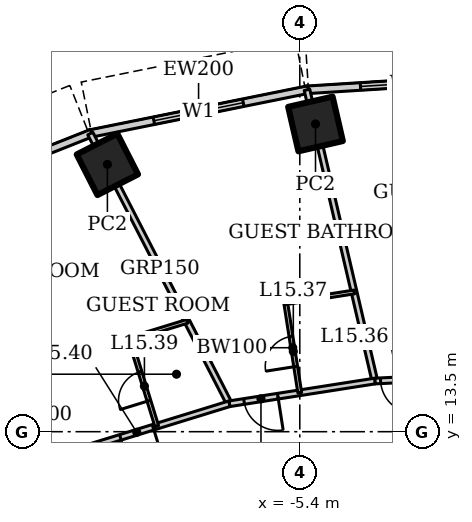
"""IFC4 building model, lengths in metres.
Left out: names, types, materials, properties, quantities, classifications, styles, units other than length and angle.
Written with IfcOpenShell. Run it as: python <this file> out.ifc"""

import sys

from ifc_helpers import new_model, si_unit, direction, frame, frame_2d, origin, origin_2d, place, context, subcontext, project, spatial, rectangle, hollow_rectangle, extrude, element, fill, save


model = new_model("IFC4")
c1 = context("Model", 3, precision=1e-05, world=origin(), true_north=direction((0.0, 1.0)))
c2 = subcontext(c1, "Body", "Model", "MODEL_VIEW")
j1 = project(units=[si_unit("LENGTHUNIT", "METRE"), si_unit("PLANEANGLEUNIT", "RADIAN")], contexts=[c1])
p1 = place(None, origin())
s1 = spatial("IfcSite", under=j1, at=p1, CompositionType="ELEMENT")
p2 = place(p1, origin())
s2 = spatial("IfcBuilding", under=s1, at=p2, CompositionType="ELEMENT")
p3 = place(p2, frame((0.0, 0.0, 69.4)))
s3 = spatial("IfcBuildingStorey", under=s2, at=p3, CompositionType="ELEMENT", Elevation=69.4)
for number, where, z_axis, x_axis in (
    (1, (-4.986, 21.598, 0.0), (0.0, 0.0, 1.0), (0.974, 0.225, 0.0)),
    (2, (-10.463, 20.534, 0.0), (0.0, 0.0, 1.0), (0.891, 0.454, 0.0)),
):
    element("IfcColumn", number, at=place(p3, frame(where, z_axis=z_axis, x_axis=x_axis)), inside=s3, PredefinedType="COLUMN", context=c2, shape_type="SweptSolid", body=[
        extrude(hollow_rectangle(XDim=1.2, YDim=1.2, WallThickness=0.1, at=origin_2d()), origin(), (0.0, 0.0, 1.0), 3.6),
    ])
p4 = place(p3, frame((0.041, 22.827, 0.0), z_axis=(0.0, 0.0, 1.0), x_axis=(-0.998018582375, -0.062919863585, 0.0)))
e3 = element("IfcWall", 3, at=p4, inside=s3, PredefinedType="SOLIDWALL", context=c2, shape_type="SweptSolid", body=[
    extrude(rectangle(XDim=5.304, YDim=0.2, at=frame_2d((2.652, 0.0))), origin(), (0.0, 0.0, 1.0), 3.45),
])
p5 = place(p4, frame((1.452, 0.0, 0.5)))
e4 = element("IfcOpeningElement", 4, at=p5, cuts=e3, PredefinedType="OPENING", context=c2, shape_type="SweptSolid", body=[
    extrude(rectangle(XDim=2.4, YDim=2.2, at=frame_2d((1.2, 1.1))), frame((0.0, 0.11, 0.0), z_axis=(0.0, -1.0, 0.0), x_axis=(1.0, 0.0, 0.0)), (0.0, 0.0, 1.0), 0.22),
])
p6 = place(p3, frame((-5.17, 22.504, 0.0), z_axis=(0.0, 0.0, 1.0), x_axis=(-0.980251657452, -0.197754110105, 0.0)))
e5 = element("IfcWall", 5, at=p6, inside=s3, PredefinedType="SOLIDWALL", context=c2, shape_type="SweptSolid", body=[
    extrude(rectangle(XDim=5.904, YDim=0.2, at=frame_2d((2.952, 0.0))), origin(), (0.0, 0.0, 1.0), 3.45),
])
p7 = place(p6, frame((1.752, 0.0, 0.5)))
e6 = element("IfcOpeningElement", 6, at=p7, cuts=e5, PredefinedType="OPENING", context=c2, shape_type="SweptSolid", body=[
    extrude(rectangle(XDim=2.4, YDim=2.2, at=frame_2d((1.2, 1.1))), frame((0.0, 0.11, 0.0), z_axis=(0.0, -1.0, 0.0), x_axis=(1.0, 0.0, 0.0)), (0.0, 0.0, 1.0), 0.22),
])
p8 = place(p3, frame((-10.869, 21.363, 0.0), z_axis=(0.0, 0.0, 1.0), x_axis=(-0.929358351251, -0.369178892895, 0.0)))
e7 = element("IfcWall", 7, at=p8, inside=s3, PredefinedType="SOLIDWALL", context=c2, shape_type="SweptSolid", body=[
    extrude(rectangle(XDim=7.692, YDim=0.2, at=frame_2d((3.846, 0.0))), origin(), (0.0, 0.0, 1.0), 3.45),
])
p9 = place(p8, frame((2.646, 0.0, 0.5)))
e8 = element("IfcOpeningElement", 8, at=p9, cuts=e7, PredefinedType="OPENING", context=c2, shape_type="SweptSolid", body=[
    extrude(rectangle(XDim=2.4, YDim=2.2, at=frame_2d((1.2, 1.1))), frame((0.0, 0.11, 0.0), z_axis=(0.0, -1.0, 0.0), x_axis=(1.0, 0.0, 0.0)), (0.0, 0.0, 1.0), 0.22),
])
p10 = place(p3, frame((-5.211, 22.496, 0.0), z_axis=(0.0, 0.0, 1.0), x_axis=(0.227056984461, -0.973881474209, 0.0)))
e9 = element("IfcWall", 9, at=p10, inside=s3, PredefinedType="PARTITIONING", context=c2, shape_type="SweptSolid", body=[
    extrude(rectangle(XDim=7.869, YDim=0.15, at=frame_2d((3.934, 0.0))), origin(), (0.0, 0.0, 1.0), 2.767),
])
p11 = place(p3, frame((-10.912, 21.346, 0.0), z_axis=(0.0, 0.0, 1.0), x_axis=(0.45752665959, -0.889195904042, 0.0)))
e10 = element("IfcWall", 10, at=p11, inside=s3, PredefinedType="PARTITIONING", context=c2, shape_type="SweptSolid", body=[
    extrude(rectangle(XDim=7.997, YDim=0.15, at=frame_2d((3.999, 0.0))), origin(), (0.0, 0.0, 1.0), 2.528),
])
p12 = place(p3, frame((0.0, 15.0, 0.0), z_axis=(0.0, 0.0, 1.0), x_axis=(-0.998809560203, -0.048779733975, 0.0)))
e11 = element("IfcWall", 11, at=p12, inside=s3, PredefinedType="PARTITIONING", context=c2, shape_type="SweptSolid", body=[
    extrude(rectangle(XDim=3.428, YDim=0.15, at=frame_2d((1.714, 0.0))), origin(), (0.0, 0.0, 1.0), 3.45),
])
p13 = place(p12, frame((2.378, 0.0, 0.0)))
e12 = element("IfcOpeningElement", 12, at=p13, cuts=e11, PredefinedType="OPENING", context=c2, shape_type="SweptSolid", body=[
    extrude(rectangle(XDim=0.9, YDim=2.1, at=frame_2d((0.45, 1.05))), frame((0.0, 0.085, 0.0), z_axis=(0.0, -1.0, 0.0), x_axis=(1.0, 0.0, 0.0)), (0.0, 0.0, 1.0), 0.17),
])
p14 = place(p3, frame((-3.424, 14.833, 0.0), z_axis=(0.0, 0.0, 1.0), x_axis=(-0.988015036573, -0.154357660987, 0.0)))
e13 = element("IfcWall", 13, at=p14, inside=s3, PredefinedType="PARTITIONING", context=c2, shape_type="SweptSolid", body=[
    extrude(rectangle(XDim=3.875, YDim=0.15, at=frame_2d((1.938, 0.0))), origin(), (0.0, 0.0, 1.0), 3.45),
])
p15 = place(p14, frame((2.583, 0.0, 0.0)))
e14 = element("IfcOpeningElement", 14, at=p15, cuts=e13, PredefinedType="OPENING", context=c2, shape_type="SweptSolid", body=[
    extrude(rectangle(XDim=0.9, YDim=2.1, at=frame_2d((0.45, 1.05))), frame((0.0, 0.085, 0.0), z_axis=(0.0, -1.0, 0.0), x_axis=(1.0, 0.0, 0.0)), (0.0, 0.0, 1.0), 0.17),
])
p16 = place(p3, frame((-7.253, 14.235, 0.0), z_axis=(0.0, 0.0, 1.0), x_axis=(-0.955657956744, -0.294478980085, 0.0)))
e15 = element("IfcWall", 15, at=p16, inside=s3, PredefinedType="PARTITIONING", context=c2, shape_type="SweptSolid", body=[
    extrude(rectangle(XDim=5.236, YDim=0.15, at=frame_2d((2.618, 0.0))), origin(), (0.0, 0.0, 1.0), 3.45),
])
p17 = place(p16, frame((2.1, 0.0, 0.0)))
e16 = element("IfcOpeningElement", 16, at=p17, cuts=e15, PredefinedType="OPENING", context=c2, shape_type="SweptSolid", body=[
    extrude(rectangle(XDim=0.9, YDim=2.1, at=frame_2d((0.45, 1.05))), frame((0.0, 0.085, 0.0), z_axis=(0.0, -1.0, 0.0), x_axis=(1.0, 0.0, 0.0)), (0.0, 0.0, 1.0), 0.17),
])
p18 = place(p3, frame((-5.4, 14.524, 0.0), z_axis=(0.0, 0.0, 1.0), x_axis=(-0.154426532979, 0.988004274238, 0.0)))
e17 = element("IfcWall", 17, at=p18, inside=s3, PredefinedType="PARTITIONING", context=c2, shape_type="SweptSolid", body=[
    extrude(rectangle(XDim=2.4, YDim=0.1, at=frame_2d((1.2, 0.0))), origin(), (0.0, 0.0, 1.0), 3.45),
])
p19 = place(p18, frame((0.7, 0.0, 0.0)))
e18 = element("IfcOpeningElement", 18, at=p19, cuts=e17, PredefinedType="OPENING", context=c2, shape_type="SweptSolid", body=[
    extrude(rectangle(XDim=0.8, YDim=2.1, at=frame_2d((0.4, 1.05))), frame((0.0, 0.06, 0.0), z_axis=(0.0, -1.0, 0.0), x_axis=(1.0, 0.0, 0.0)), (0.0, 0.0, 1.0), 0.12),
])
p20 = place(p3, frame((-5.771, 16.895, 0.0), z_axis=(0.0, 0.0, 1.0), x_axis=(0.98801840204, 0.154336117711, 0.0)))
e19 = element("IfcWall", 19, at=p20, inside=s3, PredefinedType="PARTITIONING", context=c2, shape_type="SweptSolid", body=[
    extrude(rectangle(XDim=1.827, YDim=0.1, at=frame_2d((0.914, 0.0))), origin(), (0.0, 0.0, 1.0), 3.45),
])
p21 = place(p3, frame((-9.164, 13.646, 0.0), z_axis=(0.0, 0.0, 1.0), x_axis=(-0.294507586191, 0.955649141514, 0.0)))
e20 = element("IfcWall", 20, at=p21, inside=s3, PredefinedType="PARTITIONING", context=c2, shape_type="SweptSolid", body=[
    extrude(rectangle(XDim=2.4, YDim=0.1, at=frame_2d((1.2, 0.0))), origin(), (0.0, 0.0, 1.0), 3.45),
])
p22 = place(p21, frame((0.7, 0.0, 0.0)))
e21 = element("IfcOpeningElement", 21, at=p22, cuts=e20, PredefinedType="OPENING", context=c2, shape_type="SweptSolid", body=[
    extrude(rectangle(XDim=0.8, YDim=2.1, at=frame_2d((0.4, 1.05))), frame((0.0, 0.06, 0.0), z_axis=(0.0, -1.0, 0.0), x_axis=(1.0, 0.0, 0.0)), (0.0, 0.0, 1.0), 0.12),
])
p23 = place(p3, frame((-9.871, 15.939, 0.0), z_axis=(0.0, 0.0, 1.0), x_axis=(0.955642133669, 0.29453032502, 0.0)))
e22 = element("IfcWall", 22, at=p23, inside=s3, PredefinedType="PARTITIONING", context=c2, shape_type="SweptSolid", body=[
    extrude(rectangle(XDim=1.583, YDim=0.1, at=frame_2d((0.791, 0.0))), origin(), (0.0, 0.0, 1.0), 3.45),
])
p24 = place(p5, origin())
e23 = element("IfcWindow", 23, at=p24, inside=s3, PartitioningType="SINGLE_PANEL", PredefinedType="WINDOW", context=c2, shape_type="SweptSolid", body=[
    extrude(rectangle(XDim=2.4, YDim=2.2, at=frame_2d((1.2, 1.1))), frame((0.0, 0.03, 0.0), z_axis=(0.0, -1.0, 0.0), x_axis=(1.0, 0.0, 0.0)), (0.0, 0.0, 1.0), 0.06),
])
fill(e4, e23)
p25 = place(p7, origin())
e24 = element("IfcWindow", 24, at=p25, inside=s3, PartitioningType="SINGLE_PANEL", PredefinedType="WINDOW", context=c2, shape_type="SweptSolid", body=[
    extrude(rectangle(XDim=2.4, YDim=2.2, at=frame_2d((1.2, 1.1))), frame((0.0, 0.03, 0.0), z_axis=(0.0, -1.0, 0.0), x_axis=(1.0, 0.0, 0.0)), (0.0, 0.0, 1.0), 0.06),
])
fill(e6, e24)
p26 = place(p13, origin())
e25 = element("IfcDoor", 25, at=p26, inside=s3, OperationType="SINGLE_SWING_LEFT", PredefinedType="DOOR", context=c2, shape_type="SweptSolid", body=[
    extrude(rectangle(XDim=0.9, YDim=2.1, at=frame_2d((0.45, 1.05))), frame((0.0, 0.025, 0.0), z_axis=(0.0, -1.0, 0.0), x_axis=(1.0, 0.0, 0.0)), (0.0, 0.0, 1.0), 0.05),
])
fill(e12, e25)
p27 = place(p19, origin())
e26 = element("IfcDoor", 26, at=p27, inside=s3, OperationType="SINGLE_SWING_LEFT", PredefinedType="DOOR", context=c2, shape_type="SweptSolid", body=[
    extrude(rectangle(XDim=0.8, YDim=2.1, at=frame_2d((0.4, 1.05))), frame((0.0, 0.025, 0.0), z_axis=(0.0, -1.0, 0.0), x_axis=(1.0, 0.0, 0.0)), (0.0, 0.0, 1.0), 0.05),
])
fill(e18, e26)
p28 = place(p15, origin())
e27 = element("IfcDoor", 27, at=p28, inside=s3, OperationType="SINGLE_SWING_LEFT", PredefinedType="DOOR", context=c2, shape_type="SweptSolid", body=[
    extrude(rectangle(XDim=0.9, YDim=2.1, at=frame_2d((0.45, 1.05))), frame((0.0, 0.025, 0.0), z_axis=(0.0, -1.0, 0.0), x_axis=(1.0, 0.0, 0.0)), (0.0, 0.0, 1.0), 0.05),
])
fill(e14, e27)
p29 = place(p22, origin())
e28 = element("IfcDoor", 28, at=p29, inside=s3, OperationType="SINGLE_SWING_LEFT", PredefinedType="DOOR", context=c2, shape_type="SweptSolid", body=[
    extrude(rectangle(XDim=0.8, YDim=2.1, at=frame_2d((0.4, 1.05))), frame((0.0, 0.025, 0.0), z_axis=(0.0, -1.0, 0.0), x_axis=(1.0, 0.0, 0.0)), (0.0, 0.0, 1.0), 0.05),
])
fill(e21, e28)
p30 = place(p17, origin())
e29 = element("IfcDoor", 29, at=p30, inside=s3, OperationType="SINGLE_SWING_LEFT", PredefinedType="DOOR", context=c2, shape_type="SweptSolid", body=[
    extrude(rectangle(XDim=0.9, YDim=2.1, at=frame_2d((0.45, 1.05))), frame((0.0, 0.025, 0.0), z_axis=(0.0, -1.0, 0.0), x_axis=(1.0, 0.0, 0.0)), (0.0, 0.0, 1.0), 0.05),
])
fill(e16, e29)
save(model, sys.argv[1])
